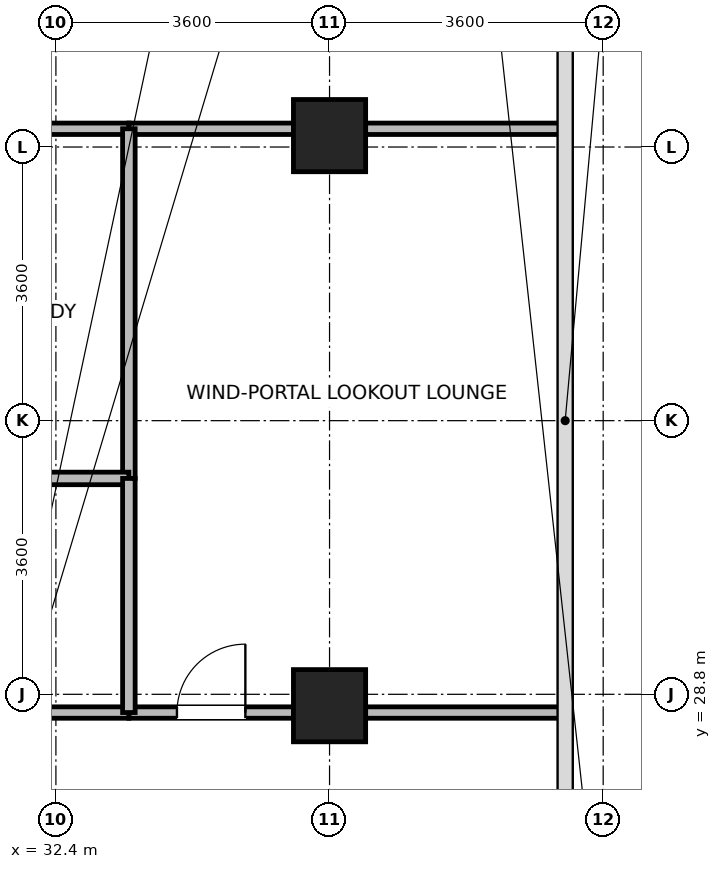
"""IFC4 building model, lengths in metres.
Left out: names, types, materials, properties, quantities, classifications, styles, units other than length and angle.
Written with IfcOpenShell. Run it as: python <this file> out.ifc"""

import sys

from ifc_helpers import new_model, si_unit, direction, frame, frame_2d, origin, origin_2d, place, context, subcontext, project, spatial, rectangle, extrude, source, transform, mapped, element, fill, save


model = new_model("IFC4")
c1 = context("Model", 3, precision=1e-05, world=origin(), true_north=direction((0.0, 1.0)))
c2 = subcontext(c1, "Body", "Model", "MODEL_VIEW")
j1 = project(units=[si_unit("LENGTHUNIT", "METRE"), si_unit("PLANEANGLEUNIT", "RADIAN")], contexts=[c1])
p1 = place(None, origin())
s1 = spatial("IfcSite", under=j1, at=p1, CompositionType="ELEMENT")
p2 = place(p1, origin())
s2 = spatial("IfcBuilding", under=s1, at=p2, CompositionType="ELEMENT")
p3 = place(p2, frame((0.0, 0.0, 242.5)))
s3 = spatial("IfcBuildingStorey", under=s2, at=p3, CompositionType="ELEMENT", Elevation=242.5)
m1 = source(origin(), c2, "Body", "SweptSolid", [
    extrude(rectangle(XDim=0.95, YDim=0.95, at=origin_2d()), origin(), (0.0, 0.0, 1.0), 3.7),
])
for number, where, z_axis, x_axis in (
    (1, (36.0, 28.65, 0.0), (0.0, 0.0, 1.0), (1.0, 0.0, 0.0)),
    (2, (36.0, 36.15, 0.0), (0.0, 0.0, 1.0), (1.0, 0.0, 0.0)),
):
    element("IfcColumn", number, at=place(p3, frame(where, z_axis=z_axis, x_axis=x_axis)), inside=s3, PredefinedType="COLUMN", context=c2, shape_type="MappedRepresentation", body=[
        mapped(m1, transform((0.0, 0.0, 0.0), x_axis=(1.0, 0.0, 0.0), y_axis=(0.0, 1.0, 0.0), z_axis=(0.0, 0.0, 1.0), scale=1.0)),
    ])
p4 = place(p3, frame((33.36, 28.56, 0.0), z_axis=(0.0, 0.0, 1.0), x_axis=(1.0, 0.0, 0.0)))
e3 = element("IfcWall", 3, at=p4, inside=s3, PredefinedType="PARTITIONING", context=c2, shape_type="SweptSolid", body=[
    extrude(rectangle(XDim=2.165, YDim=0.15, at=frame_2d((1.083, 0.0))), origin(), (0.0, 0.0, 1.0), 2.87),
])
p5 = place(p4, frame((0.633, 0.0, 0.0)))
e4 = element("IfcOpeningElement", 4, at=p5, cuts=e3, PredefinedType="OPENING", context=c2, shape_type="SweptSolid", body=[
    extrude(rectangle(XDim=0.9, YDim=2.08, at=frame_2d((0.45, 1.04))), frame((0.0, 0.085, 0.0), z_axis=(0.0, -1.0, 0.0), x_axis=(1.0, 0.0, 0.0)), (0.0, 0.0, 1.0), 0.17),
])
p6 = place(p3, frame((36.475, 28.56, 0.0), z_axis=(0.0, 0.0, 1.0), x_axis=(1.0, 0.0, 0.0)))
e5 = element("IfcWall", 5, at=p6, inside=s3, PredefinedType="PARTITIONING", context=c2, shape_type="SweptSolid", body=[
    extrude(rectangle(XDim=2.605, YDim=0.15, at=frame_2d((1.302, 0.0))), origin(), (0.0, 0.0, 1.0), 3.42),
])
p7 = place(p3, frame((33.36, 36.24, 0.0), z_axis=(0.0, 0.0, 1.0), x_axis=(1.0, 0.0, 0.0)))
e6 = element("IfcWall", 6, at=p7, inside=s3, PredefinedType="PARTITIONING", context=c2, shape_type="SweptSolid", body=[
    extrude(rectangle(XDim=2.165, YDim=0.15, at=frame_2d((1.083, 0.0))), origin(), (0.0, 0.0, 1.0), 2.87),
])
p8 = place(p3, frame((36.475, 36.24, 0.0), z_axis=(0.0, 0.0, 1.0), x_axis=(1.0, 0.0, 0.0)))
e7 = element("IfcWall", 7, at=p8, inside=s3, PredefinedType="PARTITIONING", context=c2, shape_type="SweptSolid", body=[
    extrude(rectangle(XDim=2.605, YDim=0.15, at=frame_2d((1.302, 0.0))), origin(), (0.0, 0.0, 1.0), 3.42),
])
p9 = place(p3, frame((29.275, 28.56, 0.0), z_axis=(0.0, 0.0, 1.0), x_axis=(1.0, 0.0, 0.0)))
e8 = element("IfcWall", 8, at=p9, inside=s3, PredefinedType="PARTITIONING", context=c2, shape_type="SweptSolid", body=[
    extrude(rectangle(XDim=4.085, YDim=0.15, at=frame_2d((2.042, 0.0))), origin(), (0.0, 0.0, 1.0), 2.87),
])
p10 = place(p9, frame((1.613, 0.0, 0.0)))
e9 = element("IfcOpeningElement", 9, at=p10, cuts=e8, PredefinedType="OPENING", context=c2, shape_type="SweptSolid", body=[
    extrude(rectangle(XDim=0.86, YDim=2.02, at=frame_2d((0.43, 1.01))), frame((0.0, 0.085, 0.0), z_axis=(0.0, -1.0, 0.0), x_axis=(1.0, 0.0, 0.0)), (0.0, 0.0, 1.0), 0.17),
])
p11 = place(p3, frame((29.275, 36.24, 0.0), z_axis=(0.0, 0.0, 1.0), x_axis=(1.0, 0.0, 0.0)))
e10 = element("IfcWall", 10, at=p11, inside=s3, PredefinedType="PARTITIONING", context=c2, shape_type="SweptSolid", body=[
    extrude(rectangle(XDim=4.085, YDim=0.15, at=frame_2d((2.042, 0.0))), origin(), (0.0, 0.0, 1.0), 2.87),
])
p12 = place(p11, frame((1.393, 0.0, 0.0)))
e11 = element("IfcOpeningElement", 11, at=p12, cuts=e10, PredefinedType="OPENING", context=c2, shape_type="SweptSolid", body=[
    extrude(rectangle(XDim=1.3, YDim=2.12, at=frame_2d((0.65, 1.06))), frame((0.0, 0.085, 0.0), z_axis=(0.0, -1.0, 0.0), x_axis=(1.0, 0.0, 0.0)), (0.0, 0.0, 1.0), 0.17),
])
p13 = place(p3, frame((33.36, 31.64, 0.0), z_axis=(0.0, 0.0, 1.0), x_axis=(0.0, 1.0, 0.0)))
e12 = element("IfcWall", 12, at=p13, inside=s3, PredefinedType="PARTITIONING", context=c2, shape_type="SweptSolid", body=[
    extrude(rectangle(XDim=4.6, YDim=0.165, at=frame_2d((2.3, 0.0))), origin(), (0.0, 0.0, 1.0), 3.42),
])
p14 = place(p3, frame((28.84, 31.64, 0.0), z_axis=(0.0, 0.0, 1.0), x_axis=(1.0, 0.0, 0.0)))
e13 = element("IfcWall", 13, at=p14, inside=s3, PredefinedType="PARTITIONING", context=c2, shape_type="SweptSolid", body=[
    extrude(rectangle(XDim=4.52, YDim=0.165, at=frame_2d((2.26, 0.0))), origin(), (0.0, 0.0, 1.0), 3.42),
])
p15 = place(p3, frame((33.36, 28.56, 0.0), z_axis=(0.0, 0.0, 1.0), x_axis=(0.0, 1.0, 0.0)))
e14 = element("IfcWall", 14, at=p15, inside=s3, PredefinedType="PARTITIONING", context=c2, shape_type="SweptSolid", body=[
    extrude(rectangle(XDim=3.08, YDim=0.165, at=frame_2d((1.54, 0.0))), origin(), (0.0, 0.0, 1.0), 3.42),
])
p16 = place(p5, origin())
e15 = element("IfcDoor", 15, at=p16, inside=s3, OperationType="SINGLE_SWING_RIGHT", PredefinedType="DOOR", context=c2, shape_type="SweptSolid", body=[
    extrude(rectangle(XDim=0.9, YDim=2.08, at=frame_2d((0.45, 1.04))), frame((0.0, 0.025, 0.0), z_axis=(0.0, -1.0, 0.0), x_axis=(1.0, 0.0, 0.0)), (0.0, 0.0, 1.0), 0.05),
])
fill(e4, e15)
save(model, sys.argv[1])
